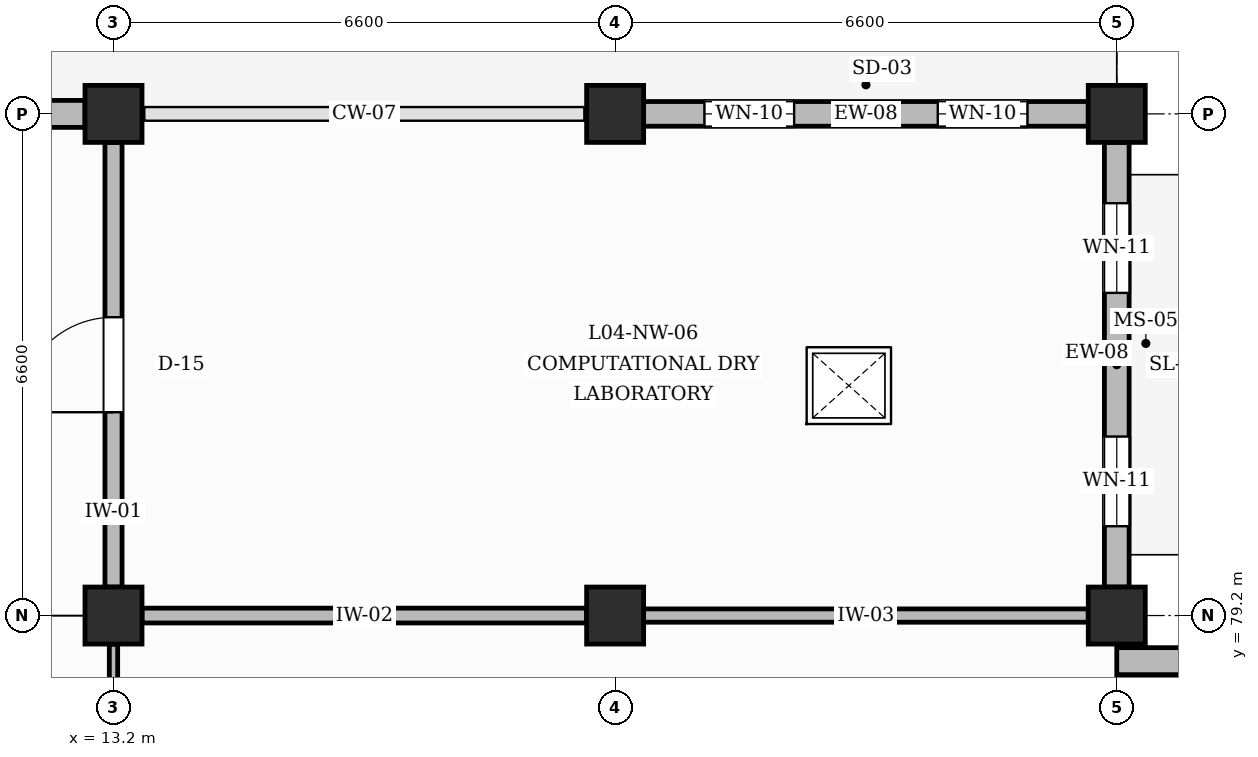
"""IFC4 building model, lengths in metres.
Left out: names, types, materials, properties, quantities, classifications, styles, units other than length and angle.
Written with IfcOpenShell. Run it as: python <this file> out.ifc"""

import sys

from ifc_helpers import new_model, si_unit, direction, frame, frame_2d, origin, origin_2d, place, context, subcontext, project, spatial, rectangle, extrude, element, fill, save


model = new_model("IFC4")
c1 = context("Model", 3, precision=1e-05, world=origin(), true_north=direction((0.0, 1.0)))
c2 = subcontext(c1, "Body", "Model", "MODEL_VIEW")
j1 = project(units=[si_unit("LENGTHUNIT", "METRE"), si_unit("PLANEANGLEUNIT", "RADIAN")], contexts=[c1])
p1 = place(None, origin())
s1 = spatial("IfcSite", under=j1, at=p1, CompositionType="ELEMENT")
p2 = place(p1, origin())
s2 = spatial("IfcBuilding", under=s1, at=p2, CompositionType="ELEMENT")
p3 = place(p2, frame((0.0, 0.0, 18.6)))
s3 = spatial("IfcBuildingStorey", under=s2, at=p3, CompositionType="ELEMENT", Elevation=18.6)
for number, where, z_axis, x_axis in (
    (1, (13.2, 79.2, 0.0), (0.0, 0.0, 1.0), (1.0, 0.0, 0.0)),
    (2, (13.2, 85.8, 0.0), (0.0, 0.0, 1.0), (1.0, 0.0, 0.0)),
    (3, (19.8, 79.2, 0.0), (0.0, 0.0, 1.0), (1.0, 0.0, 0.0)),
    (4, (19.8, 85.8, 0.0), (0.0, 0.0, 1.0), (1.0, 0.0, 0.0)),
    (5, (26.4, 79.2, 0.0), (0.0, 0.0, 1.0), (1.0, 0.0, 0.0)),
    (6, (26.4, 85.8, 0.0), (0.0, 0.0, 1.0), (1.0, 0.0, 0.0)),
):
    element("IfcColumn", number, at=place(p3, frame(where, z_axis=z_axis, x_axis=x_axis)), inside=s3, PredefinedType="COLUMN", context=c2, shape_type="SweptSolid", body=[
        extrude(rectangle(XDim=0.75, YDim=0.75, at=origin_2d()), origin(), (0.0, 0.0, 1.0), 4.2),
    ])
p4 = place(p3, frame((6.975, 85.8, 0.0), z_axis=(0.0, 0.0, 1.0), x_axis=(1.0, 0.0, 0.0)))
e7 = element("IfcWall", 7, at=p4, inside=s3, PredefinedType="SOLIDWALL", context=c2, shape_type="SweptSolid", body=[
    extrude(rectangle(XDim=5.85, YDim=0.355, at=frame_2d((2.925, 0.0))), origin(), (0.0, 0.0, 1.0), 3.26),
])
p5 = place(p4, frame((0.8, 0.0, 0.95)))
e8 = element("IfcOpeningElement", 8, at=p5, cuts=e7, PredefinedType="OPENING", context=c2, shape_type="SweptSolid", body=[
    extrude(rectangle(XDim=1.02, YDim=1.3, at=frame_2d((0.51, 0.65))), frame((0.0, 0.188, 0.0), z_axis=(0.0, -1.0, 0.0), x_axis=(1.0, 0.0, 0.0)), (0.0, 0.0, 1.0), 0.375),
])
p6 = place(p4, frame((4.03, 0.0, 0.95)))
e9 = element("IfcOpeningElement", 9, at=p6, cuts=e7, PredefinedType="OPENING", context=c2, shape_type="SweptSolid", body=[
    extrude(rectangle(XDim=1.02, YDim=1.3, at=frame_2d((0.51, 0.65))), frame((0.0, 0.188, 0.0), z_axis=(0.0, -1.0, 0.0), x_axis=(1.0, 0.0, 0.0)), (0.0, 0.0, 1.0), 0.375),
])
p7 = place(p3, frame((26.4, 78.6, 0.0), z_axis=(0.0, 0.0, 1.0), x_axis=(1.0, 0.0, 0.0)))
e10 = element("IfcWall", 10, at=p7, inside=s3, PredefinedType="SOLIDWALL", context=c2, shape_type="SweptSolid", body=[
    extrude(rectangle(XDim=2.0, YDim=0.355, at=frame_2d((1.0, 0.0))), origin(), (0.0, 0.0, 1.0), 3.26),
])
p8 = place(p3, frame((20.175, 85.8, 0.0), z_axis=(0.0, 0.0, 1.0), x_axis=(1.0, 0.0, 0.0)))
e11 = element("IfcWall", 11, at=p8, inside=s3, PredefinedType="SOLIDWALL", context=c2, shape_type="SweptSolid", body=[
    extrude(rectangle(XDim=5.85, YDim=0.325, at=frame_2d((2.925, 0.0))), origin(), (0.0, 0.0, 1.0), 3.26),
])
p9 = place(p8, frame((0.8, 0.0, 0.95)))
e12 = element("IfcOpeningElement", 12, at=p9, cuts=e11, PredefinedType="OPENING", context=c2, shape_type="SweptSolid", body=[
    extrude(rectangle(XDim=1.18, YDim=1.52, at=frame_2d((0.59, 0.76))), frame((0.0, 0.172, 0.0), z_axis=(0.0, -1.0, 0.0), x_axis=(1.0, 0.0, 0.0)), (0.0, 0.0, 1.0), 0.345),
])
p10 = place(p8, frame((3.87, 0.0, 0.95)))
e13 = element("IfcOpeningElement", 13, at=p10, cuts=e11, PredefinedType="OPENING", context=c2, shape_type="SweptSolid", body=[
    extrude(rectangle(XDim=1.18, YDim=1.52, at=frame_2d((0.59, 0.76))), frame((0.0, 0.172, 0.0), z_axis=(0.0, -1.0, 0.0), x_axis=(1.0, 0.0, 0.0)), (0.0, 0.0, 1.0), 0.345),
])
p11 = place(p3, frame((26.4, 79.575, 0.0), z_axis=(0.0, 0.0, 1.0), x_axis=(0.0, 1.0, 0.0)))
e14 = element("IfcWall", 14, at=p11, inside=s3, PredefinedType="SOLIDWALL", context=c2, shape_type="SweptSolid", body=[
    extrude(rectangle(XDim=5.85, YDim=0.325, at=frame_2d((2.925, 0.0))), origin(), (0.0, 0.0, 1.0), 3.26),
])
p12 = place(p11, frame((0.8, 0.0, 0.95)))
e15 = element("IfcOpeningElement", 15, at=p12, cuts=e14, PredefinedType="OPENING", context=c2, shape_type="SweptSolid", body=[
    extrude(rectangle(XDim=1.18, YDim=1.74, at=frame_2d((0.59, 0.87))), frame((0.0, 0.172, 0.0), z_axis=(0.0, -1.0, 0.0), x_axis=(1.0, 0.0, 0.0)), (0.0, 0.0, 1.0), 0.345),
])
p13 = place(p11, frame((3.87, 0.0, 0.95)))
e16 = element("IfcOpeningElement", 16, at=p13, cuts=e14, PredefinedType="OPENING", context=c2, shape_type="SweptSolid", body=[
    extrude(rectangle(XDim=1.18, YDim=1.74, at=frame_2d((0.59, 0.87))), frame((0.0, 0.172, 0.0), z_axis=(0.0, -1.0, 0.0), x_axis=(1.0, 0.0, 0.0)), (0.0, 0.0, 1.0), 0.345),
])
p14 = place(p3, frame((13.2, 72.975, 0.0), z_axis=(0.0, 0.0, 1.0), x_axis=(0.0, 1.0, 0.0)))
e17 = element("IfcWall", 17, at=p14, inside=s3, PredefinedType="PARTITIONING", context=c2, shape_type="SweptSolid", body=[
    extrude(rectangle(XDim=5.85, YDim=0.11, at=frame_2d((2.925, 0.0))), origin(), (0.0, 0.0, 1.0), 3.16),
])
p15 = place(p3, frame((13.2, 79.575, 0.0), z_axis=(0.0, 0.0, 1.0), x_axis=(0.0, 1.0, 0.0)))
e18 = element("IfcWall", 18, at=p15, inside=s3, PredefinedType="PARTITIONING", context=c2, shape_type="SweptSolid", body=[
    extrude(rectangle(XDim=5.85, YDim=0.225, at=frame_2d((2.925, 0.0))), origin(), (0.0, 0.0, 1.0), 3.16),
])
p16 = place(p15, frame((2.3, 0.0, 0.0)))
e19 = element("IfcOpeningElement", 19, at=p16, cuts=e18, PredefinedType="OPENING", context=c2, shape_type="SweptSolid", body=[
    extrude(rectangle(XDim=1.25, YDim=2.25, at=frame_2d((0.625, 1.125))), frame((0.0, 0.123, 0.0), z_axis=(0.0, -1.0, 0.0), x_axis=(1.0, 0.0, 0.0)), (0.0, 0.0, 1.0), 0.245),
])
p17 = place(p3, frame((13.575, 79.2, 0.0), z_axis=(0.0, 0.0, 1.0), x_axis=(1.0, 0.0, 0.0)))
e20 = element("IfcWall", 20, at=p17, inside=s3, PredefinedType="PARTITIONING", context=c2, shape_type="SweptSolid", body=[
    extrude(rectangle(XDim=5.85, YDim=0.195, at=frame_2d((2.925, 0.0))), origin(), (0.0, 0.0, 1.0), 3.16),
])
p18 = place(p3, frame((20.175, 79.2, 0.0), z_axis=(0.0, 0.0, 1.0), x_axis=(1.0, 0.0, 0.0)))
e21 = element("IfcWall", 21, at=p18, inside=s3, PredefinedType="PARTITIONING", context=c2, shape_type="SweptSolid", body=[
    extrude(rectangle(XDim=5.85, YDim=0.175, at=frame_2d((2.925, 0.0))), origin(), (0.0, 0.0, 1.0), 3.41),
])
p19 = place(p9, origin())
e22 = element("IfcWindow", 22, at=p19, inside=s3, PartitioningType="SINGLE_PANEL", PredefinedType="WINDOW", context=c2, shape_type="SweptSolid", body=[
    extrude(rectangle(XDim=1.18, YDim=1.52, at=frame_2d((0.59, 0.76))), frame((0.0, 0.03, 0.0), z_axis=(0.0, -1.0, 0.0), x_axis=(1.0, 0.0, 0.0)), (0.0, 0.0, 1.0), 0.06),
])
fill(e12, e22)
p20 = place(p10, origin())
e23 = element("IfcWindow", 23, at=p20, inside=s3, PartitioningType="SINGLE_PANEL", PredefinedType="WINDOW", context=c2, shape_type="SweptSolid", body=[
    extrude(rectangle(XDim=1.18, YDim=1.52, at=frame_2d((0.59, 0.76))), frame((0.0, 0.03, 0.0), z_axis=(0.0, -1.0, 0.0), x_axis=(1.0, 0.0, 0.0)), (0.0, 0.0, 1.0), 0.06),
])
fill(e13, e23)
p21 = place(p12, origin())
e24 = element("IfcWindow", 24, at=p21, inside=s3, PartitioningType="SINGLE_PANEL", PredefinedType="WINDOW", context=c2, shape_type="SweptSolid", body=[
    extrude(rectangle(XDim=1.18, YDim=1.74, at=frame_2d((0.59, 0.87))), frame((0.0, 0.03, 0.0), z_axis=(0.0, -1.0, 0.0), x_axis=(1.0, 0.0, 0.0)), (0.0, 0.0, 1.0), 0.06),
])
fill(e15, e24)
p22 = place(p13, origin())
e25 = element("IfcWindow", 25, at=p22, inside=s3, PartitioningType="SINGLE_PANEL", PredefinedType="WINDOW", context=c2, shape_type="SweptSolid", body=[
    extrude(rectangle(XDim=1.18, YDim=1.74, at=frame_2d((0.59, 0.87))), frame((0.0, 0.03, 0.0), z_axis=(0.0, -1.0, 0.0), x_axis=(1.0, 0.0, 0.0)), (0.0, 0.0, 1.0), 0.06),
])
fill(e16, e25)
p23 = place(p16, origin())
e26 = element("IfcDoor", 26, at=p23, inside=s3, OperationType="SINGLE_SWING_LEFT", PredefinedType="DOOR", context=c2, shape_type="SweptSolid", body=[
    extrude(rectangle(XDim=1.25, YDim=2.25, at=frame_2d((0.625, 1.125))), frame((0.0, 0.025, 0.0), z_axis=(0.0, -1.0, 0.0), x_axis=(1.0, 0.0, 0.0)), (0.0, 0.0, 1.0), 0.05),
])
fill(e19, e26)
save(model, sys.argv[1])
